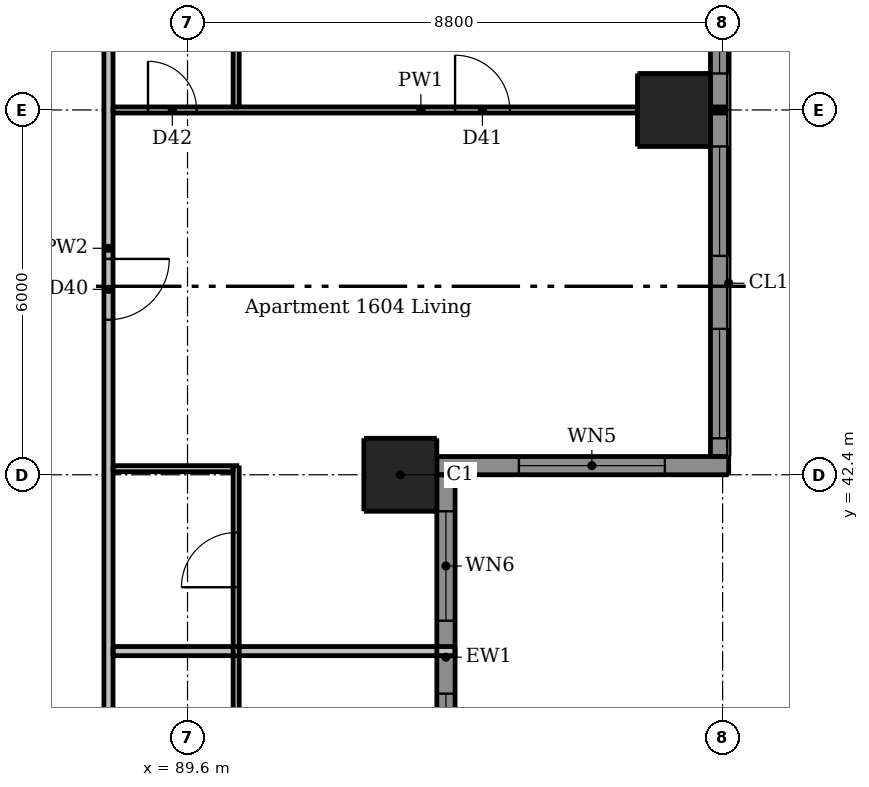
"""IFC4 building model, lengths in metres.
Left out: names, types, materials, properties, quantities, classifications, styles, units other than length and angle.
Written with IfcOpenShell. Run it as: python <this file> out.ifc"""

import sys

from ifc_helpers import new_model, si_unit, direction, frame, frame_2d, origin, origin_2d, place, context, subcontext, project, spatial, rectangle, extrude, element, fill, save


model = new_model("IFC4")
c1 = context("Model", 3, precision=1e-05, world=origin(), true_north=direction((0.0, 1.0)))
c2 = subcontext(c1, "Body", "Model", "MODEL_VIEW")
j1 = project(units=[si_unit("LENGTHUNIT", "METRE"), si_unit("PLANEANGLEUNIT", "RADIAN")], contexts=[c1])
p1 = place(None, origin())
s1 = spatial("IfcSite", under=j1, at=p1, CompositionType="ELEMENT")
p2 = place(p1, origin())
s2 = spatial("IfcBuilding", under=s1, at=p2, CompositionType="ELEMENT")
p3 = place(p2, frame((0.0, 0.0, 59.8)))
s3 = spatial("IfcBuildingStorey", under=s2, at=p3, CompositionType="ELEMENT", Elevation=59.8)
for number, where, z_axis, x_axis in (
    (1, (93.1, 42.4, 0.0), (0.0, 0.0, 1.0), (1.0, 0.0, 0.0)),
    (2, (97.6, 48.4, 0.0), (0.0, 0.0, 1.0), (1.0, 0.0, 0.0)),
):
    element("IfcColumn", number, at=place(p3, frame(where, z_axis=z_axis, x_axis=x_axis)), inside=s3, PredefinedType="COLUMN", context=c2, shape_type="SweptSolid", body=[
        extrude(rectangle(XDim=1.2, YDim=1.2, at=origin_2d()), origin(), (0.0, 0.0, 1.0), 3.05),
    ])
p4 = place(p3, frame((93.7, 42.55, 0.0), z_axis=(0.0, 0.0, 1.0), x_axis=(1.0, 0.0, 0.0)))
e3 = element("IfcWall", 3, at=p4, inside=s3, PredefinedType="SOLIDWALL", context=c2, shape_type="SweptSolid", body=[
    extrude(rectangle(XDim=4.8, YDim=0.3, at=frame_2d((2.4, 0.0))), origin(), (0.0, 0.0, 1.0), 3.05),
])
p5 = place(p4, frame((1.35, 0.0, 0.15)))
e4 = element("IfcOpeningElement", 4, at=p5, cuts=e3, PredefinedType="OPENING", context=c2, shape_type="SweptSolid", body=[
    extrude(rectangle(XDim=2.4, YDim=2.1, at=frame_2d((1.2, 1.05))), frame((0.0, 0.16, 0.0), z_axis=(0.0, -1.0, 0.0), x_axis=(1.0, 0.0, 0.0)), (0.0, 0.0, 1.0), 0.32),
])
p6 = place(p3, frame((93.85, 36.4, 0.0), z_axis=(0.0, 0.0, 1.0), x_axis=(0.0, 1.0, 0.0)))
e5 = element("IfcWall", 5, at=p6, inside=s3, PredefinedType="SOLIDWALL", context=c2, shape_type="SweptSolid", body=[
    extrude(rectangle(XDim=6.0, YDim=0.3, at=frame_2d((3.0, 0.0))), origin(), (0.0, 0.0, 1.0), 3.05),
])
p7 = place(p6, frame((0.6, 0.0, 0.15)))
e6 = element("IfcOpeningElement", 6, at=p7, cuts=e5, PredefinedType="OPENING", context=c2, shape_type="SweptSolid", body=[
    extrude(rectangle(XDim=1.8, YDim=2.1, at=frame_2d((0.9, 1.05))), frame((0.0, 0.16, 0.0), z_axis=(0.0, -1.0, 0.0), x_axis=(1.0, 0.0, 0.0)), (0.0, 0.0, 1.0), 0.32),
])
p8 = place(p6, frame((3.6, 0.0, 0.15)))
e7 = element("IfcOpeningElement", 7, at=p8, cuts=e5, PredefinedType="OPENING", context=c2, shape_type="SweptSolid", body=[
    extrude(rectangle(XDim=1.8, YDim=2.1, at=frame_2d((0.9, 1.05))), frame((0.0, 0.16, 0.0), z_axis=(0.0, -1.0, 0.0), x_axis=(1.0, 0.0, 0.0)), (0.0, 0.0, 1.0), 0.32),
])
p9 = place(p3, frame((98.35, 42.7, 0.0), z_axis=(0.0, 0.0, 1.0), x_axis=(0.0, 1.0, 0.0)))
e8 = element("IfcWall", 8, at=p9, inside=s3, PredefinedType="SOLIDWALL", context=c2, shape_type="SweptSolid", body=[
    extrude(rectangle(XDim=5.7, YDim=0.3, at=frame_2d((2.85, 0.0))), origin(), (0.0, 0.0, 1.0), 3.05),
])
p10 = place(p9, frame((0.3, 0.0, 0.15)))
e9 = element("IfcOpeningElement", 9, at=p10, cuts=e8, PredefinedType="OPENING", context=c2, shape_type="SweptSolid", body=[
    extrude(rectangle(XDim=1.8, YDim=2.1, at=frame_2d((0.9, 1.05))), frame((0.0, 0.16, 0.0), z_axis=(0.0, -1.0, 0.0), x_axis=(1.0, 0.0, 0.0)), (0.0, 0.0, 1.0), 0.32),
])
p11 = place(p9, frame((3.3, 0.0, 0.15)))
e10 = element("IfcOpeningElement", 10, at=p11, cuts=e8, PredefinedType="OPENING", context=c2, shape_type="SweptSolid", body=[
    extrude(rectangle(XDim=1.8, YDim=2.1, at=frame_2d((0.9, 1.05))), frame((0.0, 0.16, 0.0), z_axis=(0.0, -1.0, 0.0), x_axis=(1.0, 0.0, 0.0)), (0.0, 0.0, 1.0), 0.32),
])
p12 = place(p3, frame((98.35, 48.4, 0.0), z_axis=(0.0, 0.0, 1.0), x_axis=(0.0, 1.0, 0.0)))
e11 = element("IfcWall", 11, at=p12, inside=s3, PredefinedType="SOLIDWALL", context=c2, shape_type="SweptSolid", body=[
    extrude(rectangle(XDim=6.0, YDim=0.3, at=frame_2d((3.0, 0.0))), origin(), (0.0, 0.0, 1.0), 3.05),
])
p13 = place(p12, frame((0.6, 0.0, 0.15)))
e12 = element("IfcOpeningElement", 12, at=p13, cuts=e11, PredefinedType="OPENING", context=c2, shape_type="SweptSolid", body=[
    extrude(rectangle(XDim=1.8, YDim=2.1, at=frame_2d((0.9, 1.05))), frame((0.0, 0.16, 0.0), z_axis=(0.0, -1.0, 0.0), x_axis=(1.0, 0.0, 0.0)), (0.0, 0.0, 1.0), 0.32),
])
p14 = place(p12, frame((3.6, 0.0, 0.15)))
e13 = element("IfcOpeningElement", 13, at=p14, cuts=e11, PredefinedType="OPENING", context=c2, shape_type="SweptSolid", body=[
    extrude(rectangle(XDim=1.8, YDim=2.1, at=frame_2d((0.9, 1.05))), frame((0.0, 0.16, 0.0), z_axis=(0.0, -1.0, 0.0), x_axis=(1.0, 0.0, 0.0)), (0.0, 0.0, 1.0), 0.32),
])
p15 = place(p3, frame((90.4, 33.45, 0.0), z_axis=(0.0, 0.0, 1.0), x_axis=(0.0, 1.0, 0.0)))
e14 = element("IfcWall", 14, at=p15, inside=s3, PredefinedType="PARTITIONING", context=c2, shape_type="SweptSolid", body=[
    extrude(rectangle(XDim=9.1, YDim=0.1, at=frame_2d((4.55, 0.0))), origin(), (0.0, 0.0, 1.0), 3.05),
])
p16 = place(p15, frame((3.8, 0.0, 0.0)))
e15 = element("IfcOpeningElement", 15, at=p16, cuts=e14, PredefinedType="OPENING", context=c2, shape_type="SweptSolid", body=[
    extrude(rectangle(XDim=0.8, YDim=2.1, at=frame_2d((0.4, 1.05))), frame((0.0, 0.06, 0.0), z_axis=(0.0, -1.0, 0.0), x_axis=(1.0, 0.0, 0.0)), (0.0, 0.0, 1.0), 0.12),
])
p17 = place(p15, frame((7.1, 0.0, 0.0)))
e16 = element("IfcOpeningElement", 16, at=p17, cuts=e14, PredefinedType="OPENING", context=c2, shape_type="SweptSolid", body=[
    extrude(rectangle(XDim=0.9, YDim=2.1, at=frame_2d((0.45, 1.05))), frame((0.0, 0.06, 0.0), z_axis=(0.0, -1.0, 0.0), x_axis=(1.0, 0.0, 0.0)), (0.0, 0.0, 1.0), 0.12),
])
p18 = place(p3, frame((90.4, 48.45, 0.0), z_axis=(0.0, 0.0, 1.0), x_axis=(0.0, 1.0, 0.0)))
e17 = element("IfcWall", 17, at=p18, inside=s3, PredefinedType="PARTITIONING", context=c2, shape_type="SweptSolid", body=[
    extrude(rectangle(XDim=5.9, YDim=0.1, at=frame_2d((2.95, 0.0))), origin(), (0.0, 0.0, 1.0), 3.05),
])
p19 = place(p3, frame((88.375, 48.4, 0.0), z_axis=(0.0, 0.0, 1.0), x_axis=(1.0, 0.0, 0.0)))
e18 = element("IfcWall", 18, at=p19, inside=s3, PredefinedType="PARTITIONING", context=c2, shape_type="SweptSolid", body=[
    extrude(rectangle(XDim=10.125, YDim=0.1, at=frame_2d((5.062, 0.0))), origin(), (0.0, 0.0, 1.0), 2.516),
])
p20 = place(p19, frame((5.625, 0.0, 0.0)))
e19 = element("IfcOpeningElement", 19, at=p20, cuts=e18, PredefinedType="OPENING", context=c2, shape_type="SweptSolid", body=[
    extrude(rectangle(XDim=0.9, YDim=2.1, at=frame_2d((0.45, 1.05))), frame((0.0, 0.06, 0.0), z_axis=(0.0, -1.0, 0.0), x_axis=(1.0, 0.0, 0.0)), (0.0, 0.0, 1.0), 0.12),
])
p21 = place(p19, frame((0.575, 0.0, 0.0)))
e20 = element("IfcOpeningElement", 20, at=p21, cuts=e18, PredefinedType="OPENING", context=c2, shape_type="SweptSolid", body=[
    extrude(rectangle(XDim=0.8, YDim=2.1, at=frame_2d((0.4, 1.05))), frame((0.0, 0.06, 0.0), z_axis=(0.0, -1.0, 0.0), x_axis=(1.0, 0.0, 0.0)), (0.0, 0.0, 1.0), 0.12),
])
p22 = place(p3, frame((88.375, 42.5, 0.0), z_axis=(0.0, 0.0, 1.0), x_axis=(1.0, 0.0, 0.0)))
e21 = element("IfcWall", 21, at=p22, inside=s3, PredefinedType="PARTITIONING", context=c2, shape_type="SweptSolid", body=[
    extrude(rectangle(XDim=1.975, YDim=0.1, at=frame_2d((0.988, 0.0))), origin(), (0.0, 0.0, 1.0), 2.59),
])
p23 = place(p3, frame((88.3, 60.475, 0.0), z_axis=(0.0, 0.0, 1.0), x_axis=(0.0, -1.0, 0.0)))
e22 = element("IfcWall", 22, at=p23, inside=s3, PredefinedType="PARTITIONING", context=c2, shape_type="SweptSolid", body=[
    extrude(rectangle(XDim=28.7, YDim=0.15, at=frame_2d((14.35, 0.0))), origin(), (0.0, 0.0, 1.0), 3.05),
])
p24 = place(p23, frame((27.425, 0.0, 0.0)))
e23 = element("IfcOpeningElement", 23, at=p24, cuts=e22, PredefinedType="OPENING", context=c2, shape_type="SweptSolid", body=[
    extrude(rectangle(XDim=1.0, YDim=2.1, at=frame_2d((0.5, 1.05))), frame((0.0, 0.085, 0.0), z_axis=(0.0, -1.0, 0.0), x_axis=(1.0, 0.0, 0.0)), (0.0, 0.0, 1.0), 0.17),
])
p25 = place(p23, frame((14.525, 0.0, 0.0)))
e24 = element("IfcOpeningElement", 24, at=p25, cuts=e22, PredefinedType="OPENING", context=c2, shape_type="SweptSolid", body=[
    extrude(rectangle(XDim=1.0, YDim=2.1, at=frame_2d((0.5, 1.05))), frame((0.0, 0.085, 0.0), z_axis=(0.0, -1.0, 0.0), x_axis=(1.0, 0.0, 0.0)), (0.0, 0.0, 1.0), 0.17),
])
p26 = place(p23, frame((3.775, 0.0, 0.0)))
e25 = element("IfcOpeningElement", 25, at=p26, cuts=e22, PredefinedType="OPENING", context=c2, shape_type="SweptSolid", body=[
    extrude(rectangle(XDim=1.0, YDim=2.1, at=frame_2d((0.5, 1.05))), frame((0.0, 0.085, 0.0), z_axis=(0.0, -1.0, 0.0), x_axis=(1.0, 0.0, 0.0)), (0.0, 0.0, 1.0), 0.17),
])
p27 = place(p3, frame((88.375, 39.5, 0.0), z_axis=(0.0, 0.0, 1.0), x_axis=(1.0, 0.0, 0.0)))
e26 = element("IfcWall", 26, at=p27, inside=s3, PredefinedType="PARTITIONING", context=c2, shape_type="SweptSolid", body=[
    extrude(rectangle(XDim=5.625, YDim=0.15, at=frame_2d((2.812, 0.0))), origin(), (0.0, 0.0, 1.0), 3.05),
])
p28 = place(p5, origin())
e27 = element("IfcWindow", 27, at=p28, inside=s3, PartitioningType="DOUBLE_PANEL_VERTICAL", PredefinedType="WINDOW", context=c2, shape_type="SweptSolid", body=[
    extrude(rectangle(XDim=2.4, YDim=2.1, at=frame_2d((1.2, 1.05))), frame((0.0, 0.03, 0.0), z_axis=(0.0, -1.0, 0.0), x_axis=(1.0, 0.0, 0.0)), (0.0, 0.0, 1.0), 0.06),
])
fill(e4, e27)
p29 = place(p7, origin())
e28 = element("IfcWindow", 28, at=p29, inside=s3, PartitioningType="DOUBLE_PANEL_VERTICAL", PredefinedType="WINDOW", context=c2, shape_type="SweptSolid", body=[
    extrude(rectangle(XDim=1.8, YDim=2.1, at=frame_2d((0.9, 1.05))), frame((0.0, 0.03, 0.0), z_axis=(0.0, -1.0, 0.0), x_axis=(1.0, 0.0, 0.0)), (0.0, 0.0, 1.0), 0.06),
])
fill(e6, e28)
p30 = place(p8, origin())
e29 = element("IfcWindow", 29, at=p30, inside=s3, PartitioningType="DOUBLE_PANEL_VERTICAL", PredefinedType="WINDOW", context=c2, shape_type="SweptSolid", body=[
    extrude(rectangle(XDim=1.8, YDim=2.1, at=frame_2d((0.9, 1.05))), frame((0.0, 0.03, 0.0), z_axis=(0.0, -1.0, 0.0), x_axis=(1.0, 0.0, 0.0)), (0.0, 0.0, 1.0), 0.06),
])
fill(e7, e29)
p31 = place(p10, origin())
e30 = element("IfcWindow", 30, at=p31, inside=s3, PartitioningType="DOUBLE_PANEL_VERTICAL", PredefinedType="WINDOW", context=c2, shape_type="SweptSolid", body=[
    extrude(rectangle(XDim=1.8, YDim=2.1, at=frame_2d((0.9, 1.05))), frame((0.0, 0.03, 0.0), z_axis=(0.0, -1.0, 0.0), x_axis=(1.0, 0.0, 0.0)), (0.0, 0.0, 1.0), 0.06),
])
fill(e9, e30)
p32 = place(p11, origin())
e31 = element("IfcWindow", 31, at=p32, inside=s3, PartitioningType="DOUBLE_PANEL_VERTICAL", PredefinedType="WINDOW", context=c2, shape_type="SweptSolid", body=[
    extrude(rectangle(XDim=1.8, YDim=2.1, at=frame_2d((0.9, 1.05))), frame((0.0, 0.03, 0.0), z_axis=(0.0, -1.0, 0.0), x_axis=(1.0, 0.0, 0.0)), (0.0, 0.0, 1.0), 0.06),
])
fill(e10, e31)
p33 = place(p13, origin())
e32 = element("IfcWindow", 32, at=p33, inside=s3, PartitioningType="DOUBLE_PANEL_VERTICAL", PredefinedType="WINDOW", context=c2, shape_type="SweptSolid", body=[
    extrude(rectangle(XDim=1.8, YDim=2.1, at=frame_2d((0.9, 1.05))), frame((0.0, 0.03, 0.0), z_axis=(0.0, -1.0, 0.0), x_axis=(1.0, 0.0, 0.0)), (0.0, 0.0, 1.0), 0.06),
])
fill(e12, e32)
p34 = place(p25, origin())
e33 = element("IfcDoor", 33, at=p34, inside=s3, OperationType="SINGLE_SWING_LEFT", PredefinedType="DOOR", context=c2, shape_type="SweptSolid", body=[
    extrude(rectangle(XDim=1.0, YDim=2.1, at=frame_2d((0.5, 1.05))), frame((0.0, 0.025, 0.0), z_axis=(0.0, -1.0, 0.0), x_axis=(1.0, 0.0, 0.0)), (0.0, 0.0, 1.0), 0.05),
])
fill(e24, e33)
p35 = place(p17, origin())
e34 = element("IfcDoor", 34, at=p35, inside=s3, OperationType="SINGLE_SWING_LEFT", PredefinedType="DOOR", context=c2, shape_type="SweptSolid", body=[
    extrude(rectangle(XDim=0.9, YDim=2.1, at=frame_2d((0.45, 1.05))), frame((0.0, 0.025, 0.0), z_axis=(0.0, -1.0, 0.0), x_axis=(1.0, 0.0, 0.0)), (0.0, 0.0, 1.0), 0.05),
])
fill(e16, e34)
p36 = place(p20, origin())
e35 = element("IfcDoor", 35, at=p36, inside=s3, OperationType="SINGLE_SWING_LEFT", PredefinedType="DOOR", context=c2, shape_type="SweptSolid", body=[
    extrude(rectangle(XDim=0.9, YDim=2.1, at=frame_2d((0.45, 1.05))), frame((0.0, 0.025, 0.0), z_axis=(0.0, -1.0, 0.0), x_axis=(1.0, 0.0, 0.0)), (0.0, 0.0, 1.0), 0.05),
])
fill(e19, e35)
p37 = place(p21, origin())
e36 = element("IfcDoor", 36, at=p37, inside=s3, OperationType="SINGLE_SWING_LEFT", PredefinedType="DOOR", context=c2, shape_type="SweptSolid", body=[
    extrude(rectangle(XDim=0.8, YDim=2.1, at=frame_2d((0.4, 1.05))), frame((0.0, 0.025, 0.0), z_axis=(0.0, -1.0, 0.0), x_axis=(1.0, 0.0, 0.0)), (0.0, 0.0, 1.0), 0.05),
])
fill(e20, e36)
save(model, sys.argv[1])
